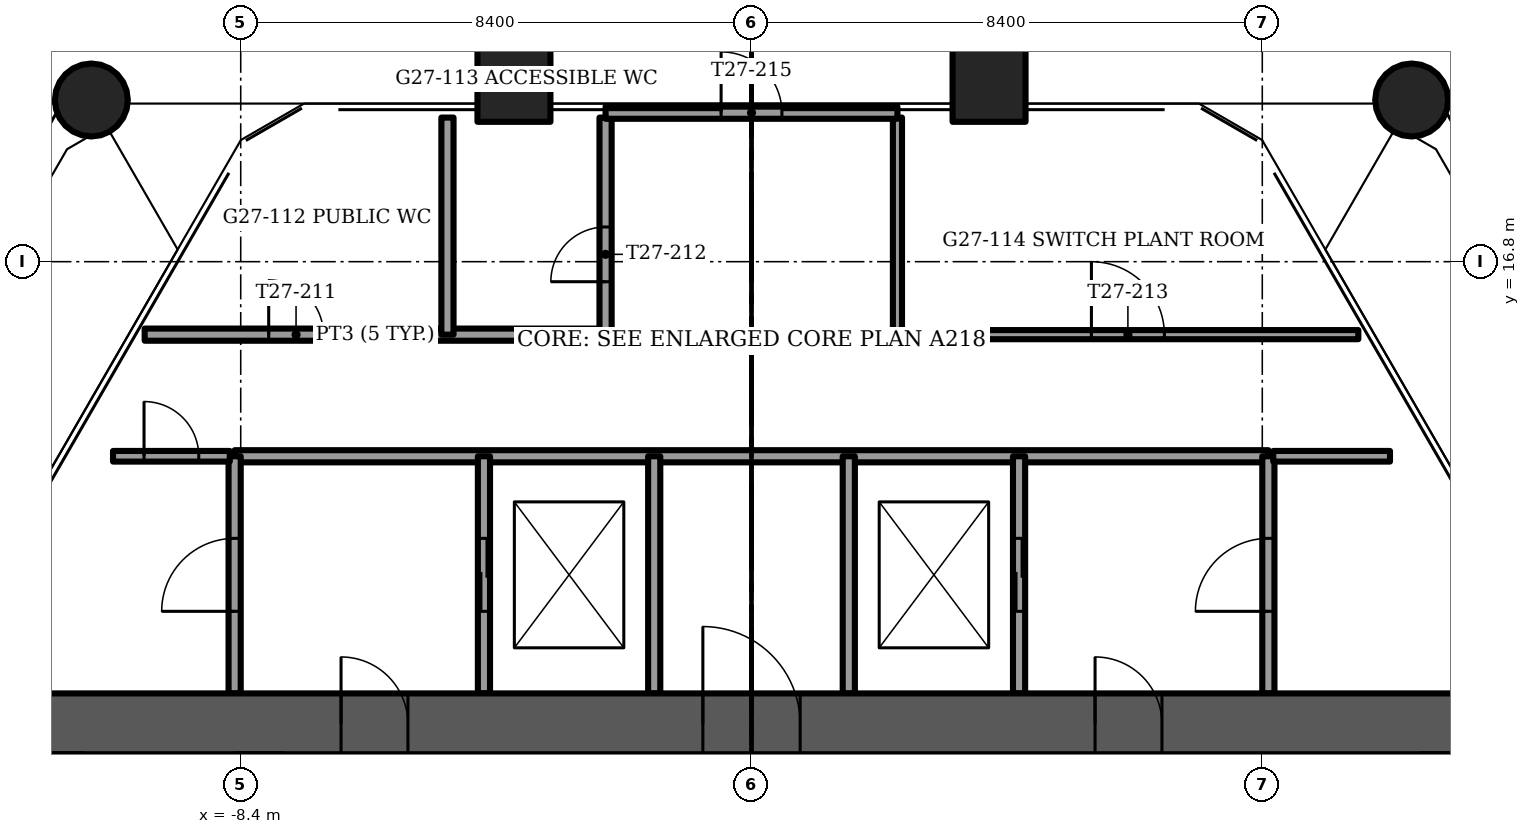
"""IFC4 building model, lengths in metres.
Left out: names, types, materials, properties, quantities, classifications, styles, units other than length and angle.
Written with IfcOpenShell. Run it as: python <this file> out.ifc"""

import sys

from ifc_helpers import new_model, si_unit, direction, frame, frame_2d, origin, origin_2d, place, context, subcontext, project, spatial, rectangle, circle, extrude, element, fill, save


model = new_model("IFC4")
c1 = context("Model", 3, precision=1e-05, world=origin(), true_north=direction((0.0, 1.0)))
c2 = subcontext(c1, "Body", "Model", "MODEL_VIEW")
j1 = project(units=[si_unit("LENGTHUNIT", "METRE"), si_unit("PLANEANGLEUNIT", "RADIAN")], contexts=[c1])
p1 = place(None, origin())
s1 = spatial("IfcSite", under=j1, at=p1, CompositionType="ELEMENT")
p2 = place(p1, origin())
s2 = spatial("IfcBuilding", under=s1, at=p2, CompositionType="ELEMENT")
p3 = place(p2, frame((0.0, 0.0, 108.0)))
s3 = spatial("IfcBuildingStorey", under=s2, at=p3, CompositionType="ELEMENT", Elevation=108.0)
for number, where, z_axis, x_axis in (
    (1, (-10.857, 19.459, -1.2), (0.0, 0.0, 1.0), (1.0, 0.0, 0.0)),
    (2, (10.857, 19.459, -1.2), (0.0, 0.0, 1.0), (1.0, 0.0, 0.0)),
):
    element("IfcColumn", number, at=place(p3, frame(where, z_axis=z_axis, x_axis=x_axis)), inside=s3, PredefinedType="COLUMN", context=c2, shape_type="SweptSolid", body=[
        extrude(circle(Radius=0.6, at=origin_2d()), origin(), (0.0, 0.0, 1.0), 8.0),
    ])
for number, where, z_axis, x_axis in (
    (3, (3.907, 19.7, -1.2), (0.0, 0.0, 1.0), (1.0, 0.0, 0.0)),
    (4, (-3.907, 19.7, -1.2), (0.0, 0.0, 1.0), (1.0, 0.0, 0.0)),
):
    element("IfcColumn", number, at=place(p3, frame(where, z_axis=z_axis, x_axis=x_axis)), inside=s3, PredefinedType="COLUMN", context=c2, shape_type="SweptSolid", body=[
        extrude(rectangle(XDim=1.2, YDim=1.2, at=origin_2d()), origin(), (0.0, 0.0, 1.0), 8.0),
    ])
p4 = place(p3, frame((-12.0, 9.2, -0.3), z_axis=(0.0, 0.0, 1.0), x_axis=(1.0, 0.0, 0.0)))
e5 = element("IfcWall", 5, at=p4, inside=s3, PredefinedType="SHEAR", context=c2, shape_type="SweptSolid", body=[
    extrude(rectangle(XDim=24.0, YDim=1.0, at=frame_2d((12.0, 0.0))), origin(), (0.0, 0.0, 1.0), 8.0),
])
p5 = place(p4, frame((11.2, 0.0, 0.0)))
e6 = element("IfcOpeningElement", 6, at=p5, cuts=e5, PredefinedType="OPENING", context=c2, shape_type="SweptSolid", body=[
    extrude(rectangle(XDim=1.6, YDim=2.1, at=frame_2d((0.8, 1.05))), frame((0.0, 0.5, 0.0), z_axis=(0.0, -1.0, 0.0), x_axis=(1.0, 0.0, 0.0)), (0.0, 0.0, 1.0), 1.0),
])
p6 = place(p4, frame((5.25, 0.0, 0.0)))
e7 = element("IfcOpeningElement", 7, at=p6, cuts=e5, PredefinedType="OPENING", context=c2, shape_type="SweptSolid", body=[
    extrude(rectangle(XDim=1.1, YDim=2.1, at=frame_2d((0.55, 1.05))), frame((0.0, 0.5, 0.0), z_axis=(0.0, -1.0, 0.0), x_axis=(1.0, 0.0, 0.0)), (0.0, 0.0, 1.0), 1.0),
])
p7 = place(p4, frame((17.65, 0.0, 0.0)))
e8 = element("IfcOpeningElement", 8, at=p7, cuts=e5, PredefinedType="OPENING", context=c2, shape_type="SweptSolid", body=[
    extrude(rectangle(XDim=1.1, YDim=2.1, at=frame_2d((0.55, 1.05))), frame((0.0, 0.5, 0.0), z_axis=(0.0, -1.0, 0.0), x_axis=(1.0, 0.0, 0.0)), (0.0, 0.0, 1.0), 1.0),
])
p8 = place(p3, frame((-8.5, 13.6, 0.0), z_axis=(0.0, 0.0, 1.0), x_axis=(1.0, 0.0, 0.0)))
e9 = element("IfcWall", 9, at=p8, inside=s3, PredefinedType="PARTITIONING", context=c2, shape_type="SweptSolid", body=[
    extrude(rectangle(XDim=17.0, YDim=0.2, at=frame_2d((8.5, 0.0))), origin(), (0.0, 0.0, 1.0), 7.7),
])
p9 = place(p3, frame((-8.5, 9.7, 0.0), z_axis=(0.0, 0.0, 1.0), x_axis=(0.0, 1.0, 0.0)))
e10 = element("IfcWall", 10, at=p9, inside=s3, PredefinedType="PARTITIONING", context=c2, shape_type="SweptSolid", body=[
    extrude(rectangle(XDim=3.9, YDim=0.2, at=frame_2d((1.95, 0.0))), origin(), (0.0, 0.0, 1.0), 7.7),
])
p10 = place(p9, frame((1.35, 0.0, 0.0)))
e11 = element("IfcOpeningElement", 11, at=p10, cuts=e10, PredefinedType="OPENING", context=c2, shape_type="SweptSolid", body=[
    extrude(rectangle(XDim=1.2, YDim=2.1, at=frame_2d((0.6, 1.05))), frame((0.0, 0.1, 0.0), z_axis=(0.0, -1.0, 0.0), x_axis=(1.0, 0.0, 0.0)), (0.0, 0.0, 1.0), 0.2),
])
p11 = place(p3, frame((8.5, 9.7, 0.0), z_axis=(0.0, 0.0, 1.0), x_axis=(0.0, 1.0, 0.0)))
e12 = element("IfcWall", 12, at=p11, inside=s3, PredefinedType="PARTITIONING", context=c2, shape_type="SweptSolid", body=[
    extrude(rectangle(XDim=3.9, YDim=0.2, at=frame_2d((1.95, 0.0))), origin(), (0.0, 0.0, 1.0), 7.7),
])
p12 = place(p11, frame((1.35, 0.0, 0.0)))
e13 = element("IfcOpeningElement", 13, at=p12, cuts=e12, PredefinedType="OPENING", context=c2, shape_type="SweptSolid", body=[
    extrude(rectangle(XDim=1.2, YDim=2.1, at=frame_2d((0.6, 1.05))), frame((0.0, 0.1, 0.0), z_axis=(0.0, -1.0, 0.0), x_axis=(1.0, 0.0, 0.0)), (0.0, 0.0, 1.0), 0.2),
])
p13 = place(p3, frame((-4.4, 9.7, 0.0), z_axis=(0.0, 0.0, 1.0), x_axis=(0.0, 1.0, 0.0)))
e14 = element("IfcWall", 14, at=p13, inside=s3, PredefinedType="PARTITIONING", context=c2, shape_type="SweptSolid", body=[
    extrude(rectangle(XDim=3.9, YDim=0.2, at=frame_2d((1.95, 0.0))), origin(), (0.0, 0.0, 1.0), 7.7),
])
p14 = place(p13, frame((1.35, 0.0, 0.0)))
e15 = element("IfcOpeningElement", 15, at=p14, cuts=e14, PredefinedType="OPENING", context=c2, shape_type="SweptSolid", body=[
    extrude(rectangle(XDim=1.2, YDim=2.1, at=frame_2d((0.6, 1.05))), frame((0.0, 0.1, 0.0), z_axis=(0.0, -1.0, 0.0), x_axis=(1.0, 0.0, 0.0)), (0.0, 0.0, 1.0), 0.2),
])
p15 = place(p3, frame((4.4, 9.7, 0.0), z_axis=(0.0, 0.0, 1.0), x_axis=(0.0, 1.0, 0.0)))
e16 = element("IfcWall", 16, at=p15, inside=s3, PredefinedType="PARTITIONING", context=c2, shape_type="SweptSolid", body=[
    extrude(rectangle(XDim=3.9, YDim=0.2, at=frame_2d((1.95, 0.0))), origin(), (0.0, 0.0, 1.0), 7.7),
])
p16 = place(p15, frame((1.35, 0.0, 0.0)))
e17 = element("IfcOpeningElement", 17, at=p16, cuts=e16, PredefinedType="OPENING", context=c2, shape_type="SweptSolid", body=[
    extrude(rectangle(XDim=1.2, YDim=2.1, at=frame_2d((0.6, 1.05))), frame((0.0, 0.1, 0.0), z_axis=(0.0, -1.0, 0.0), x_axis=(1.0, 0.0, 0.0)), (0.0, 0.0, 1.0), 0.2),
])
for number, where, z_axis, x_axis in (
    (18, (-1.6, 9.7, 0.0), (0.0, 0.0, 1.0), (0.0, 1.0, 0.0)),
    (19, (1.6, 9.7, 0.0), (0.0, 0.0, 1.0), (0.0, 1.0, 0.0)),
):
    element("IfcWall", number, at=place(p3, frame(where, z_axis=z_axis, x_axis=x_axis)), inside=s3, PredefinedType="PARTITIONING", context=c2, shape_type="SweptSolid", body=[
        extrude(rectangle(XDim=3.9, YDim=0.2, at=frame_2d((1.95, 0.0))), origin(), (0.0, 0.0, 1.0), 7.7),
    ])
p17 = place(p3, frame((-10.5, 13.6, 0.0), z_axis=(0.0, 0.0, 1.0), x_axis=(1.0, 0.0, 0.0)))
e20 = element("IfcWall", 20, at=p17, inside=s3, PredefinedType="PARTITIONING", context=c2, shape_type="SweptSolid", body=[
    extrude(rectangle(XDim=1.92, YDim=0.175, at=frame_2d((0.96, 0.0))), origin(), (0.0, 0.0, 1.0), 7.7),
])
p18 = place(p17, frame((0.51, 0.0, 0.0)))
e21 = element("IfcOpeningElement", 21, at=p18, cuts=e20, PredefinedType="OPENING", context=c2, shape_type="SweptSolid", body=[
    extrude(rectangle(XDim=0.9, YDim=2.1, at=frame_2d((0.45, 1.05))), frame((0.0, 0.087, 0.0), z_axis=(0.0, -1.0, 0.0), x_axis=(1.0, 0.0, 0.0)), (0.0, 0.0, 1.0), 0.175),
])
p19 = place(p3, frame((8.58, 13.6, 0.0), z_axis=(0.0, 0.0, 1.0), x_axis=(1.0, 0.0, 0.0)))
e22 = element("IfcWall", 22, at=p19, inside=s3, PredefinedType="PARTITIONING", context=c2, shape_type="SweptSolid", body=[
    extrude(rectangle(XDim=1.92, YDim=0.175, at=frame_2d((0.96, 0.0))), origin(), (0.0, 0.0, 1.0), 7.7),
])
p20 = place(p3, frame((-9.98, 15.6, 0.0), z_axis=(0.0, 0.0, 1.0), x_axis=(1.0, 0.0, 0.0)))
e23 = element("IfcWall", 23, at=p20, inside=s3, PredefinedType="PARTITIONING", context=c2, shape_type="SweptSolid", body=[
    extrude(rectangle(XDim=7.58, YDim=0.2, at=frame_2d((3.79, 0.0))), origin(), (0.0, 0.0, 1.0), 7.7),
])
p21 = place(p20, frame((2.04, 0.0, 0.0)))
e24 = element("IfcOpeningElement", 24, at=p21, cuts=e23, PredefinedType="OPENING", context=c2, shape_type="SweptSolid", body=[
    extrude(rectangle(XDim=0.9, YDim=2.1, at=frame_2d((0.45, 1.05))), frame((0.0, 0.1, 0.0), z_axis=(0.0, -1.0, 0.0), x_axis=(1.0, 0.0, 0.0)), (0.0, 0.0, 1.0), 0.2),
])
p22 = place(p3, frame((-5.0, 15.6, 0.0), z_axis=(0.0, 0.0, 1.0), x_axis=(0.0, 1.0, 0.0)))
e25 = element("IfcWall", 25, at=p22, inside=s3, PredefinedType="PARTITIONING", context=c2, shape_type="SweptSolid", body=[
    extrude(rectangle(XDim=3.57, YDim=0.2, at=frame_2d((1.785, 0.0))), origin(), (0.0, 0.0, 1.0), 7.7),
])
p23 = place(p3, frame((-2.4, 15.6, 0.0), z_axis=(0.0, 0.0, 1.0), x_axis=(0.0, 1.0, 0.0)))
e26 = element("IfcWall", 26, at=p23, inside=s3, PredefinedType="PARTITIONING", context=c2, shape_type="SweptSolid", body=[
    extrude(rectangle(XDim=3.57, YDim=0.2, at=frame_2d((1.785, 0.0))), origin(), (0.0, 0.0, 1.0), 7.7),
])
p24 = place(p23, frame((0.871, 0.0, 0.0)))
e27 = element("IfcOpeningElement", 27, at=p24, cuts=e26, PredefinedType="OPENING", context=c2, shape_type="SweptSolid", body=[
    extrude(rectangle(XDim=0.9, YDim=2.1, at=frame_2d((0.45, 1.05))), frame((0.0, 0.1, 0.0), z_axis=(0.0, -1.0, 0.0), x_axis=(1.0, 0.0, 0.0)), (0.0, 0.0, 1.0), 0.2),
])
p25 = place(p3, frame((2.4, 15.6, 0.0), z_axis=(0.0, 0.0, 1.0), x_axis=(1.0, 0.0, 0.0)))
e28 = element("IfcWall", 28, at=p25, inside=s3, PredefinedType="PARTITIONING", context=c2, shape_type="SweptSolid", body=[
    extrude(rectangle(XDim=7.58, YDim=0.15, at=frame_2d((3.79, 0.0))), origin(), (0.0, 0.0, 1.0), 7.7),
])
p26 = place(p25, frame((3.19, 0.0, 0.0)))
e29 = element("IfcOpeningElement", 29, at=p26, cuts=e28, PredefinedType="OPENING", context=c2, shape_type="SweptSolid", body=[
    extrude(rectangle(XDim=1.2, YDim=2.1, at=frame_2d((0.6, 1.05))), frame((0.0, 0.075, 0.0), z_axis=(0.0, -1.0, 0.0), x_axis=(1.0, 0.0, 0.0)), (0.0, 0.0, 1.0), 0.15),
])
p27 = place(p3, frame((2.4, 15.6, 0.0), z_axis=(0.0, 0.0, 1.0), x_axis=(0.0, 1.0, 0.0)))
e30 = element("IfcWall", 30, at=p27, inside=s3, PredefinedType="PARTITIONING", context=c2, shape_type="SweptSolid", body=[
    extrude(rectangle(XDim=3.57, YDim=0.15, at=frame_2d((1.785, 0.0))), origin(), (0.0, 0.0, 1.0), 7.7),
])
p28 = place(p3, frame((-2.4, 19.25, 0.0), z_axis=(0.0, 0.0, 1.0), x_axis=(1.0, 0.0, 0.0)))
e31 = element("IfcWall", 31, at=p28, inside=s3, PredefinedType="PARTITIONING", context=c2, shape_type="SweptSolid", body=[
    extrude(rectangle(XDim=4.8, YDim=0.2, at=frame_2d((2.4, 0.0))), origin(), (0.0, 0.0, 1.0), 7.7),
])
p29 = place(p28, frame((1.9, 0.0, 0.0)))
e32 = element("IfcOpeningElement", 32, at=p29, cuts=e31, PredefinedType="OPENING", context=c2, shape_type="SweptSolid", body=[
    extrude(rectangle(XDim=1.0, YDim=2.1, at=frame_2d((0.5, 1.05))), frame((0.0, 0.1, 0.0), z_axis=(0.0, -1.0, 0.0), x_axis=(1.0, 0.0, 0.0)), (0.0, 0.0, 1.0), 0.2),
])
p30 = place(p5, origin())
e33 = element("IfcDoor", 33, at=p30, inside=s3, OperationType="DOUBLE_DOOR_SINGLE_SWING", PredefinedType="DOOR", context=c2, shape_type="SweptSolid", body=[
    extrude(rectangle(XDim=1.6, YDim=2.1, at=frame_2d((0.8, 1.05))), frame((0.0, 0.025, 0.0), z_axis=(0.0, -1.0, 0.0), x_axis=(1.0, 0.0, 0.0)), (0.0, 0.0, 1.0), 0.05),
])
fill(e6, e33)
p31 = place(p6, origin())
e34 = element("IfcDoor", 34, at=p31, inside=s3, OperationType="SINGLE_SWING_LEFT", PredefinedType="DOOR", context=c2, shape_type="SweptSolid", body=[
    extrude(rectangle(XDim=1.1, YDim=2.1, at=frame_2d((0.55, 1.05))), frame((0.0, 0.025, 0.0), z_axis=(0.0, -1.0, 0.0), x_axis=(1.0, 0.0, 0.0)), (0.0, 0.0, 1.0), 0.05),
])
fill(e7, e34)
p32 = place(p7, origin())
e35 = element("IfcDoor", 35, at=p32, inside=s3, OperationType="SINGLE_SWING_RIGHT", PredefinedType="DOOR", context=c2, shape_type="SweptSolid", body=[
    extrude(rectangle(XDim=1.1, YDim=2.1, at=frame_2d((0.55, 1.05))), frame((0.0, 0.025, 0.0), z_axis=(0.0, -1.0, 0.0), x_axis=(1.0, 0.0, 0.0)), (0.0, 0.0, 1.0), 0.05),
])
fill(e8, e35)
p33 = place(p14, origin())
e36 = element("IfcDoor", 36, at=p33, inside=s3, OperationType="SLIDING_TO_LEFT", PredefinedType="DOOR", context=c2, shape_type="SweptSolid", body=[
    extrude(rectangle(XDim=1.2, YDim=2.1, at=frame_2d((0.6, 1.05))), frame((0.0, 0.025, 0.0), z_axis=(0.0, -1.0, 0.0), x_axis=(1.0, 0.0, 0.0)), (0.0, 0.0, 1.0), 0.05),
])
fill(e15, e36)
p34 = place(p10, origin())
e37 = element("IfcDoor", 37, at=p34, inside=s3, OperationType="SINGLE_SWING_LEFT", PredefinedType="DOOR", context=c2, shape_type="SweptSolid", body=[
    extrude(rectangle(XDim=1.2, YDim=2.1, at=frame_2d((0.6, 1.05))), frame((0.0, 0.025, 0.0), z_axis=(0.0, -1.0, 0.0), x_axis=(1.0, 0.0, 0.0)), (0.0, 0.0, 1.0), 0.05),
])
fill(e11, e37)
p35 = place(p16, origin())
e38 = element("IfcDoor", 38, at=p35, inside=s3, OperationType="SLIDING_TO_LEFT", PredefinedType="DOOR", context=c2, shape_type="SweptSolid", body=[
    extrude(rectangle(XDim=1.2, YDim=2.1, at=frame_2d((0.6, 1.05))), frame((0.0, 0.025, 0.0), z_axis=(0.0, -1.0, 0.0), x_axis=(1.0, 0.0, 0.0)), (0.0, 0.0, 1.0), 0.05),
])
fill(e17, e38)
p36 = place(p12, origin())
e39 = element("IfcDoor", 39, at=p36, inside=s3, OperationType="SINGLE_SWING_LEFT", PredefinedType="DOOR", context=c2, shape_type="SweptSolid", body=[
    extrude(rectangle(XDim=1.2, YDim=2.1, at=frame_2d((0.6, 1.05))), frame((0.0, 0.025, 0.0), z_axis=(0.0, -1.0, 0.0), x_axis=(1.0, 0.0, 0.0)), (0.0, 0.0, 1.0), 0.05),
])
fill(e13, e39)
p37 = place(p18, origin())
e40 = element("IfcDoor", 40, at=p37, inside=s3, OperationType="SINGLE_SWING_RIGHT", PredefinedType="DOOR", context=c2, shape_type="SweptSolid", body=[
    extrude(rectangle(XDim=0.9, YDim=2.1, at=frame_2d((0.45, 1.05))), frame((0.0, 0.025, 0.0), z_axis=(0.0, -1.0, 0.0), x_axis=(1.0, 0.0, 0.0)), (0.0, 0.0, 1.0), 0.05),
])
fill(e21, e40)
p38 = place(p21, origin())
e41 = element("IfcDoor", 41, at=p38, inside=s3, OperationType="SINGLE_SWING_LEFT", PredefinedType="DOOR", context=c2, shape_type="SweptSolid", body=[
    extrude(rectangle(XDim=0.9, YDim=2.1, at=frame_2d((0.45, 1.05))), frame((0.0, 0.025, 0.0), z_axis=(0.0, -1.0, 0.0), x_axis=(1.0, 0.0, 0.0)), (0.0, 0.0, 1.0), 0.05),
])
fill(e24, e41)
p39 = place(p24, origin())
e42 = element("IfcDoor", 42, at=p39, inside=s3, OperationType="SINGLE_SWING_RIGHT", PredefinedType="DOOR", context=c2, shape_type="SweptSolid", body=[
    extrude(rectangle(XDim=0.9, YDim=2.1, at=frame_2d((0.45, 1.05))), frame((0.0, 0.025, 0.0), z_axis=(0.0, -1.0, 0.0), x_axis=(1.0, 0.0, 0.0)), (0.0, 0.0, 1.0), 0.05),
])
fill(e27, e42)
p40 = place(p26, origin())
e43 = element("IfcDoor", 43, at=p40, inside=s3, OperationType="SINGLE_SWING_LEFT", PredefinedType="DOOR", context=c2, shape_type="SweptSolid", body=[
    extrude(rectangle(XDim=1.2, YDim=2.1, at=frame_2d((0.6, 1.05))), frame((0.0, 0.025, 0.0), z_axis=(0.0, -1.0, 0.0), x_axis=(1.0, 0.0, 0.0)), (0.0, 0.0, 1.0), 0.05),
])
fill(e29, e43)
p41 = place(p29, origin())
e44 = element("IfcDoor", 44, at=p41, inside=s3, OperationType="SINGLE_SWING_LEFT", PredefinedType="DOOR", context=c2, shape_type="SweptSolid", body=[
    extrude(rectangle(XDim=1.0, YDim=2.1, at=frame_2d((0.5, 1.05))), frame((0.0, 0.025, 0.0), z_axis=(0.0, -1.0, 0.0), x_axis=(1.0, 0.0, 0.0)), (0.0, 0.0, 1.0), 0.05),
])
fill(e32, e44)
save(model, sys.argv[1])
